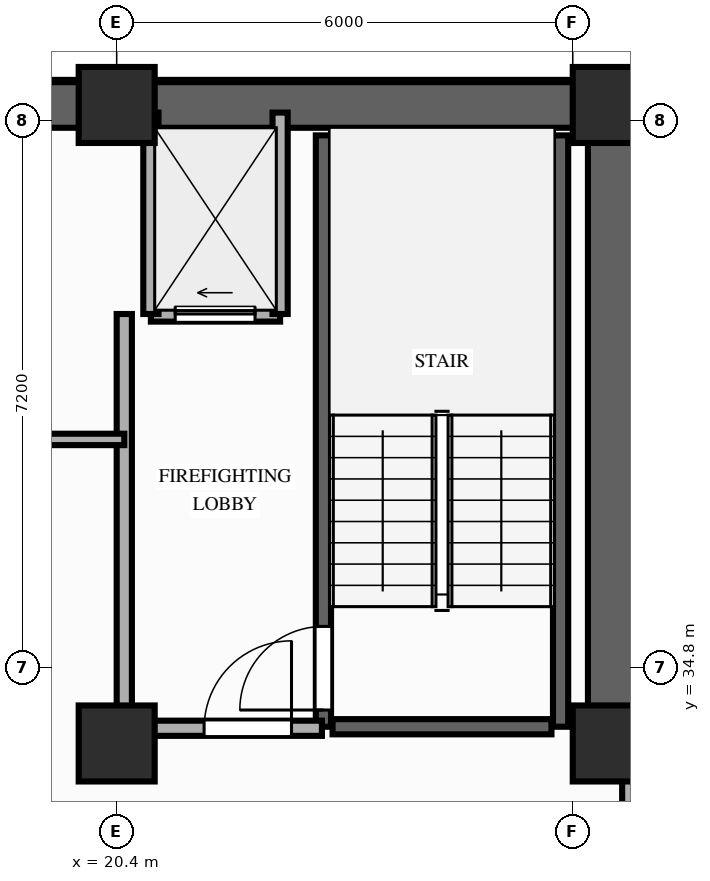
"""IFC4 building model, lengths in metres.
Left out: names, types, materials, properties, quantities, classifications, styles, units other than length and angle.
Written with IfcOpenShell. Run it as: python <this file> out.ifc"""

import sys

from ifc_helpers import new_model, si_unit, direction, frame, frame_2d, origin, origin_2d, place, context, subcontext, project, spatial, rectangle, extrude, element, fill, save


model = new_model("IFC4")
c1 = context("Model", 3, precision=1e-05, world=origin(), true_north=direction((0.0, 1.0)))
c2 = subcontext(c1, "Body", "Model", "MODEL_VIEW")
j1 = project(units=[si_unit("LENGTHUNIT", "METRE"), si_unit("PLANEANGLEUNIT", "RADIAN")], contexts=[c1])
p1 = place(None, origin())
s1 = spatial("IfcSite", under=j1, at=p1, CompositionType="ELEMENT")
p2 = place(p1, origin())
s2 = spatial("IfcBuilding", under=s1, at=p2, CompositionType="ELEMENT")
p3 = place(p2, frame((0.0, 0.0, 110.6)))
s3 = spatial("IfcBuildingStorey", under=s2, at=p3, CompositionType="ELEMENT", Elevation=110.6)
for number, where, z_axis, x_axis in (
    (1, (20.4, 33.8, 0.0), (0.0, 0.0, 1.0), (1.0, 0.0, 0.0)),
    (2, (26.9, 33.8, 0.0), (0.0, 0.0, 1.0), (1.0, 0.0, 0.0)),
    (3, (20.4, 42.2, 0.0), (0.0, 0.0, 1.0), (1.0, 0.0, 0.0)),
    (4, (26.9, 42.2, 0.0), (0.0, 0.0, 1.0), (1.0, 0.0, 0.0)),
):
    element("IfcColumn", number, at=place(p3, frame(where, z_axis=z_axis, x_axis=x_axis)), inside=s3, PredefinedType="COLUMN", context=c2, shape_type="SweptSolid", body=[
        extrude(rectangle(XDim=1.0, YDim=1.0, at=origin_2d()), origin(), (0.0, 0.0, 1.0), 3.2),
    ])
p4 = place(p3, frame((6.45, 42.2, 0.0), z_axis=(0.0, 0.0, 1.0), x_axis=(1.0, 0.0, 0.0)))
e5 = element("IfcWall", 5, at=p4, inside=s3, PredefinedType="SHEAR", context=c2, shape_type="SweptSolid", body=[
    extrude(rectangle(XDim=20.45, YDim=0.6, at=frame_2d((10.225, 0.0))), origin(), (0.0, 0.0, 1.0), 3.02),
])
p5 = place(p3, frame((26.9, 33.8, 0.0), z_axis=(0.0, 0.0, 1.0), x_axis=(0.0, 1.0, 0.0)))
e6 = element("IfcWall", 6, at=p5, inside=s3, PredefinedType="SHEAR", context=c2, shape_type="SweptSolid", body=[
    extrude(rectangle(XDim=7.95, YDim=0.6, at=frame_2d((3.975, 0.0))), origin(), (0.0, 0.0, 1.0), 3.02),
])
p6 = place(p3, frame((23.12, 34.02, 0.0), z_axis=(0.0, 0.0, 1.0), x_axis=(0.0, 1.0, 0.0)))
e7 = element("IfcWall", 7, at=p6, inside=s3, PredefinedType="SHEAR", context=c2, shape_type="SweptSolid", body=[
    extrude(rectangle(XDim=7.78, YDim=0.2, at=frame_2d((3.89, 0.0))), origin(), (0.0, 0.0, 1.0), 3.02),
])
p7 = place(p6, frame((0.22, 0.0, 0.0)))
e8 = element("IfcOpeningElement", 8, at=p7, cuts=e7, PredefinedType="OPENING", context=c2, shape_type="SweptSolid", body=[
    extrude(rectangle(XDim=1.1, YDim=2.15, at=frame_2d((0.55, 1.075))), frame((0.0, 0.11, 0.0), z_axis=(0.0, -1.0, 0.0), x_axis=(1.0, 0.0, 0.0)), (0.0, 0.0, 1.0), 0.22),
])
p8 = place(p3, frame((26.24, 34.02, 0.0), z_axis=(0.0, 0.0, 1.0), x_axis=(0.0, 1.0, 0.0)))
e9 = element("IfcWall", 9, at=p8, inside=s3, PredefinedType="SHEAR", context=c2, shape_type="SweptSolid", body=[
    extrude(rectangle(XDim=7.78, YDim=0.2, at=frame_2d((3.89, 0.0))), origin(), (0.0, 0.0, 1.0), 3.02),
])
p9 = place(p3, frame((23.24, 34.02, 0.0), z_axis=(0.0, 0.0, 1.0), x_axis=(1.0, 0.0, 0.0)))
e10 = element("IfcWall", 10, at=p9, inside=s3, PredefinedType="SHEAR", context=c2, shape_type="SweptSolid", body=[
    extrude(rectangle(XDim=2.88, YDim=0.2, at=frame_2d((1.44, 0.0))), origin(), (0.0, 0.0, 1.0), 3.02),
])
p10 = place(p3, frame((20.85, 39.45, 0.0), z_axis=(0.0, 0.0, 1.0), x_axis=(1.0, 0.0, 0.0)))
e11 = element("IfcWall", 11, at=p10, inside=s3, PredefinedType="MOVABLE", context=c2, shape_type="SweptSolid", body=[
    extrude(rectangle(XDim=1.7, YDim=0.2, at=frame_2d((0.85, 0.0))), origin(), (0.0, 0.0, 1.0), 3.02),
])
p11 = place(p10, frame((0.32, 0.0, 0.0)))
e12 = element("IfcOpeningElement", 12, at=p11, cuts=e11, PredefinedType="OPENING", context=c2, shape_type="SweptSolid", body=[
    extrude(rectangle(XDim=1.05, YDim=2.15, at=frame_2d((0.525, 1.075))), frame((0.0, 0.11, 0.0), z_axis=(0.0, -1.0, 0.0), x_axis=(1.0, 0.0, 0.0)), (0.0, 0.0, 1.0), 0.22),
])
for number, where, z_axis, x_axis in (
    (13, (20.85, 39.45, 0.0), (0.0, 0.0, 1.0), (0.0, 1.0, 0.0)),
    (14, (22.55, 39.45, 0.0), (0.0, 0.0, 1.0), (0.0, 1.0, 0.0)),
):
    element("IfcWall", number, at=place(p3, frame(where, z_axis=z_axis, x_axis=x_axis)), inside=s3, PredefinedType="MOVABLE", context=c2, shape_type="SweptSolid", body=[
        extrude(rectangle(XDim=2.65, YDim=0.2, at=frame_2d((1.325, 0.0))), origin(), (0.0, 0.0, 1.0), 2.4),
    ])
p12 = place(p3, frame((20.5, 34.0, 0.0), z_axis=(0.0, 0.0, 1.0), x_axis=(0.0, 1.0, 0.0)))
e15 = element("IfcWall", 15, at=p12, inside=s3, PredefinedType="PARTITIONING", context=c2, shape_type="SweptSolid", body=[
    extrude(rectangle(XDim=5.45, YDim=0.2, at=frame_2d((2.725, 0.0))), origin(), (0.0, 0.0, 1.0), 2.4),
])
p13 = place(p3, frame((20.5, 34.0, 0.0), z_axis=(0.0, 0.0, 1.0), x_axis=(1.0, 0.0, 0.0)))
e16 = element("IfcWall", 16, at=p13, inside=s3, PredefinedType="PARTITIONING", context=c2, shape_type="SweptSolid", body=[
    extrude(rectangle(XDim=2.6, YDim=0.2, at=frame_2d((1.3, 0.0))), origin(), (0.0, 0.0, 1.0), 2.4),
])
p14 = place(p13, frame((1.05, 0.0, 0.0)))
e17 = element("IfcOpeningElement", 17, at=p14, cuts=e16, PredefinedType="OPENING", context=c2, shape_type="SweptSolid", body=[
    extrude(rectangle(XDim=1.15, YDim=2.15, at=frame_2d((0.575, 1.075))), frame((0.0, 0.11, 0.0), z_axis=(0.0, -1.0, 0.0), x_axis=(1.0, 0.0, 0.0)), (0.0, 0.0, 1.0), 0.22),
])
p15 = place(p3, frame((12.9, 37.8, 0.0), z_axis=(0.0, 0.0, 1.0), x_axis=(1.0, 0.0, 0.0)))
e18 = element("IfcWall", 18, at=p15, inside=s3, PredefinedType="PARTITIONING", context=c2, shape_type="SweptSolid", body=[
    extrude(rectangle(XDim=7.6, YDim=0.15, at=frame_2d((3.8, 0.0))), origin(), (0.0, 0.0, 1.0), 3.02),
])
p16 = place(p15, frame((1.3, 0.0, 0.0)))
e19 = element("IfcOpeningElement", 19, at=p16, cuts=e18, PredefinedType="OPENING", context=c2, shape_type="SweptSolid", body=[
    extrude(rectangle(XDim=0.95, YDim=2.15, at=frame_2d((0.475, 1.075))), frame((0.0, 0.085, 0.0), z_axis=(0.0, -1.0, 0.0), x_axis=(1.0, 0.0, 0.0)), (0.0, 0.0, 1.0), 0.17),
])
p17 = place(p15, frame((5.1, 0.0, 0.0)))
e20 = element("IfcOpeningElement", 20, at=p17, cuts=e18, PredefinedType="OPENING", context=c2, shape_type="SweptSolid", body=[
    extrude(rectangle(XDim=0.95, YDim=2.15, at=frame_2d((0.475, 1.075))), frame((0.0, 0.085, 0.0), z_axis=(0.0, -1.0, 0.0), x_axis=(1.0, 0.0, 0.0)), (0.0, 0.0, 1.0), 0.17),
])
p18 = place(p3, frame((27.15, 32.0, 0.0), z_axis=(0.0, 0.0, 1.0), x_axis=(0.0, 1.0, 0.0)))
e21 = element("IfcWall", 21, at=p18, inside=s3, PredefinedType="PARTITIONING", context=c2, shape_type="SweptSolid", body=[
    extrude(rectangle(XDim=1.68, YDim=0.2, at=frame_2d((0.84, 0.0))), origin(), (0.0, 0.0, 1.0), 2.4),
])
p19 = place(p7, origin())
e22 = element("IfcDoor", 22, at=p19, inside=s3, OperationType="SINGLE_SWING_LEFT", PredefinedType="DOOR", context=c2, shape_type="SweptSolid", body=[
    extrude(rectangle(XDim=1.1, YDim=2.15, at=frame_2d((0.55, 1.075))), frame((0.0, 0.025, 0.0), z_axis=(0.0, -1.0, 0.0), x_axis=(1.0, 0.0, 0.0)), (0.0, 0.0, 1.0), 0.05),
])
fill(e8, e22)
p20 = place(p11, origin())
e23 = element("IfcDoor", 23, at=p20, inside=s3, OperationType="SLIDING_TO_LEFT", PredefinedType="DOOR", context=c2, shape_type="SweptSolid", body=[
    extrude(rectangle(XDim=1.05, YDim=2.15, at=frame_2d((0.525, 1.075))), frame((0.0, 0.025, 0.0), z_axis=(0.0, -1.0, 0.0), x_axis=(1.0, 0.0, 0.0)), (0.0, 0.0, 1.0), 0.05),
])
fill(e12, e23)
p21 = place(p14, origin())
e24 = element("IfcDoor", 24, at=p21, inside=s3, OperationType="SINGLE_SWING_RIGHT", PredefinedType="DOOR", context=c2, shape_type="SweptSolid", body=[
    extrude(rectangle(XDim=1.15, YDim=2.15, at=frame_2d((0.575, 1.075))), frame((0.0, 0.025, 0.0), z_axis=(0.0, -1.0, 0.0), x_axis=(1.0, 0.0, 0.0)), (0.0, 0.0, 1.0), 0.05),
])
fill(e17, e24)
save(model, sys.argv[1])
